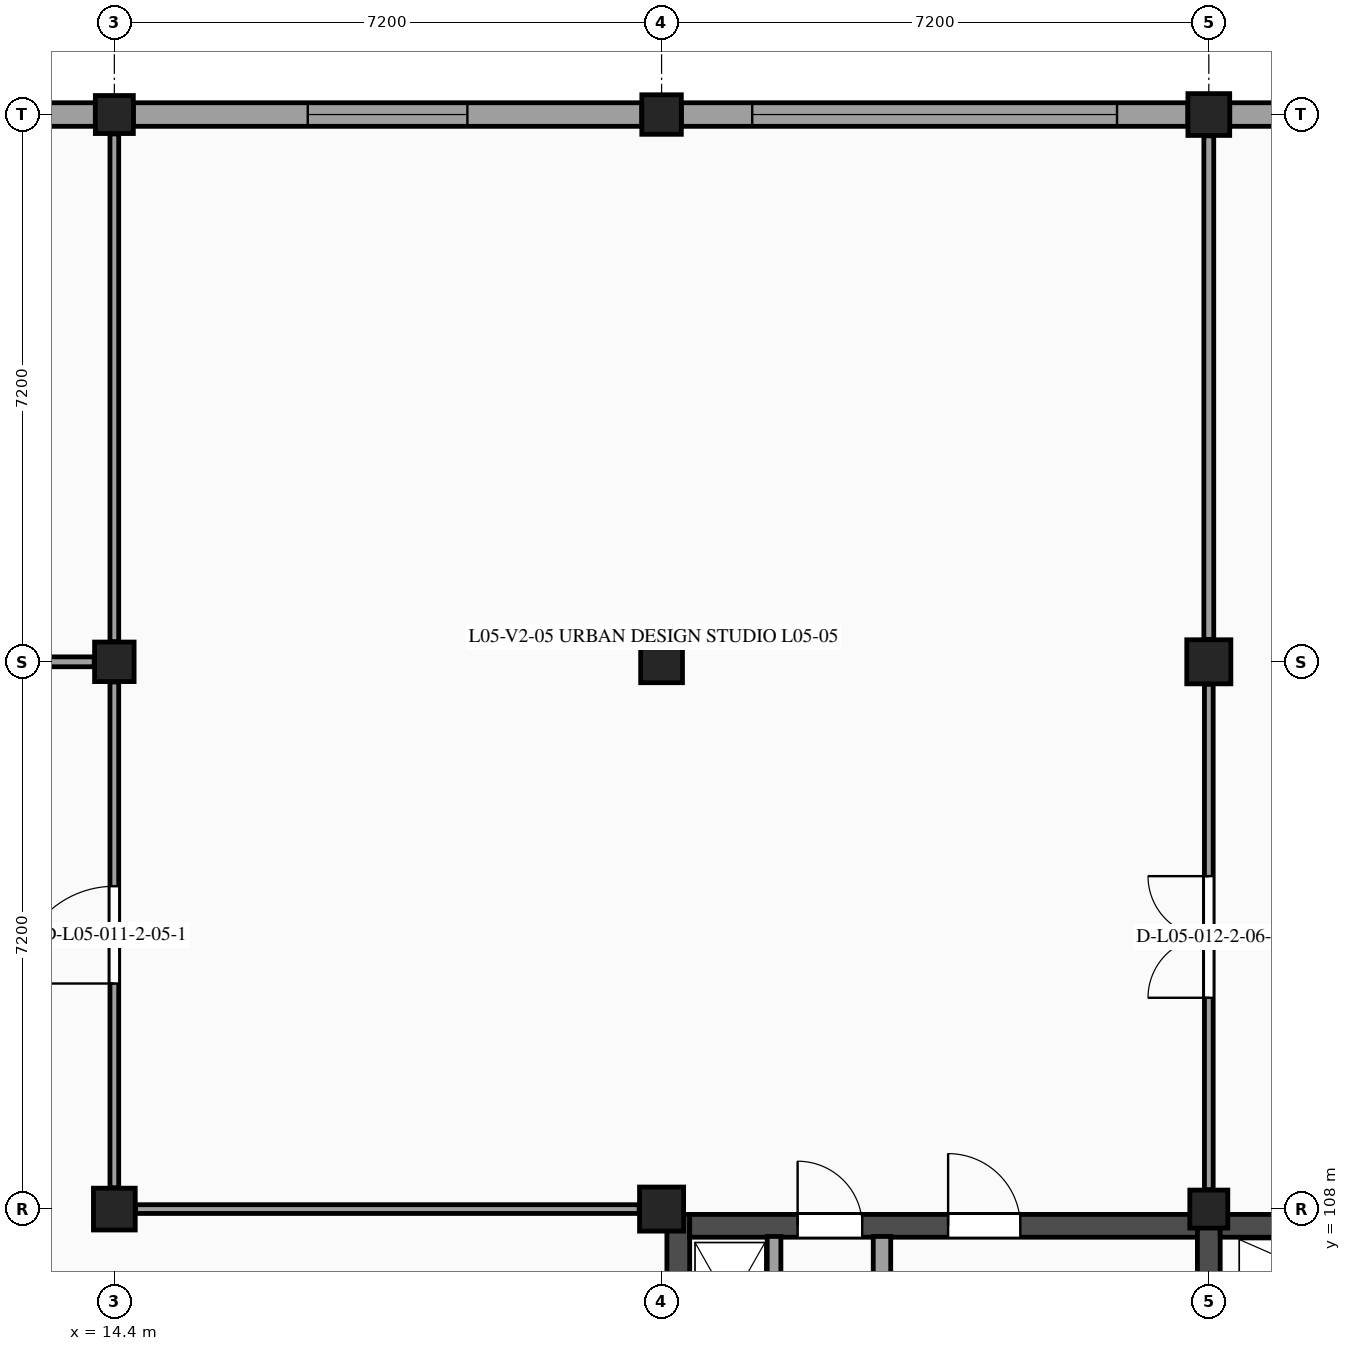
"""IFC4 building model, lengths in metres.
Left out: names, types, materials, properties, quantities, classifications, styles, units other than length and angle.
Written with IfcOpenShell. Run it as: python <this file> out.ifc"""

import sys

from ifc_helpers import new_model, si_unit, direction, frame, frame_2d, origin, origin_2d, place, context, subcontext, project, spatial, rectangle, extrude, element, fill, save


model = new_model("IFC4")
c1 = context("Model", 3, precision=1e-05, world=origin(), true_north=direction((0.0, 1.0)))
c2 = subcontext(c1, "Body", "Model", "MODEL_VIEW")
j1 = project(units=[si_unit("LENGTHUNIT", "METRE"), si_unit("PLANEANGLEUNIT", "RADIAN")], contexts=[c1])
p1 = place(None, origin())
s1 = spatial("IfcSite", under=j1, at=p1, CompositionType="ELEMENT")
p2 = place(p1, origin())
s2 = spatial("IfcBuilding", under=s1, at=p2, CompositionType="ELEMENT")
p3 = place(p2, frame((0.0, 0.0, 22.8)))
s3 = spatial("IfcBuildingStorey", under=s2, at=p3, CompositionType="ELEMENT", Elevation=22.8)
p4 = place(p3, frame((14.4, 108.0, 0.0), z_axis=(0.0, 0.0, 1.0), x_axis=(1.0, 0.0, 0.0)))
e1 = element("IfcColumn", 1, at=p4, inside=s3, PredefinedType="COLUMN", context=c2, shape_type="SweptSolid", body=[
    extrude(rectangle(XDim=0.55, YDim=0.55, at=origin_2d()), origin(), (0.0, 0.0, 1.0), 3.9),
])
p5 = place(p3, frame((14.4, 115.2, 0.0), z_axis=(0.0, 0.0, 1.0), x_axis=(1.0, 0.0, 0.0)))
e2 = element("IfcColumn", 2, at=p5, inside=s3, PredefinedType="COLUMN", context=c2, shape_type="SweptSolid", body=[
    extrude(rectangle(XDim=0.52, YDim=0.52, at=origin_2d()), origin(), (0.0, 0.0, 1.0), 3.9),
])
p6 = place(p3, frame((14.4, 122.4, 0.0), z_axis=(0.0, 0.0, 1.0), x_axis=(1.0, 0.0, 0.0)))
e3 = element("IfcColumn", 3, at=p6, inside=s3, PredefinedType="COLUMN", context=c2, shape_type="SweptSolid", body=[
    extrude(rectangle(XDim=0.5, YDim=0.5, at=origin_2d()), origin(), (0.0, 0.0, 1.0), 3.9),
])
p7 = place(p3, frame((21.6, 108.0, 0.0), z_axis=(0.0, 0.0, 1.0), x_axis=(1.0, 0.0, 0.0)))
e4 = element("IfcColumn", 4, at=p7, inside=s3, PredefinedType="COLUMN", context=c2, shape_type="SweptSolid", body=[
    extrude(rectangle(XDim=0.58, YDim=0.58, at=origin_2d()), origin(), (0.0, 0.0, 1.0), 3.9),
])
p8 = place(p3, frame((21.6, 115.2, 0.0), z_axis=(0.0, 0.0, 1.0), x_axis=(1.0, 0.0, 0.0)))
e5 = element("IfcColumn", 5, at=p8, inside=s3, PredefinedType="COLUMN", context=c2, shape_type="SweptSolid", body=[
    extrude(rectangle(XDim=0.55, YDim=0.55, at=origin_2d()), origin(), (0.0, 0.0, 1.0), 3.9),
])
p9 = place(p3, frame((21.6, 122.4, 0.0), z_axis=(0.0, 0.0, 1.0), x_axis=(1.0, 0.0, 0.0)))
e6 = element("IfcColumn", 6, at=p9, inside=s3, PredefinedType="COLUMN", context=c2, shape_type="SweptSolid", body=[
    extrude(rectangle(XDim=0.52, YDim=0.52, at=origin_2d()), origin(), (0.0, 0.0, 1.0), 3.9),
])
p10 = place(p3, frame((28.8, 108.0, 0.0), z_axis=(0.0, 0.0, 1.0), x_axis=(1.0, 0.0, 0.0)))
e7 = element("IfcColumn", 7, at=p10, inside=s3, PredefinedType="COLUMN", context=c2, shape_type="SweptSolid", body=[
    extrude(rectangle(XDim=0.5, YDim=0.5, at=origin_2d()), origin(), (0.0, 0.0, 1.0), 3.9),
])
p11 = place(p3, frame((28.8, 115.2, 0.0), z_axis=(0.0, 0.0, 1.0), x_axis=(1.0, 0.0, 0.0)))
e8 = element("IfcColumn", 8, at=p11, inside=s3, PredefinedType="COLUMN", context=c2, shape_type="SweptSolid", body=[
    extrude(rectangle(XDim=0.58, YDim=0.58, at=origin_2d()), origin(), (0.0, 0.0, 1.0), 3.9),
])
p12 = place(p3, frame((28.8, 122.4, 0.0), z_axis=(0.0, 0.0, 1.0), x_axis=(1.0, 0.0, 0.0)))
e9 = element("IfcColumn", 9, at=p12, inside=s3, PredefinedType="COLUMN", context=c2, shape_type="SweptSolid", body=[
    extrude(rectangle(XDim=0.55, YDim=0.55, at=origin_2d()), origin(), (0.0, 0.0, 1.0), 3.9),
])
p13 = place(p3, frame((7.49, 122.4, 0.0), z_axis=(0.0, 0.0, 1.0), x_axis=(1.0, 0.0, 0.0)))
e10 = element("IfcWall", 10, at=p13, inside=s3, PredefinedType="STANDARD", context=c2, shape_type="SweptSolid", body=[
    extrude(rectangle(XDim=6.66, YDim=0.31, at=frame_2d((3.33, 0.0))), origin(), (0.0, 0.0, 1.0), 3.095),
])
p14 = place(p13, frame((2.08, 0.0, 0.98)))
e11 = element("IfcOpeningElement", 11, at=p14, cuts=e10, PredefinedType="OPENING", context=c2, shape_type="SweptSolid", body=[
    extrude(rectangle(XDim=2.5, YDim=1.35, at=frame_2d((1.25, 0.675))), frame((0.0, 0.165, 0.0), z_axis=(0.0, -1.0, 0.0), x_axis=(1.0, 0.0, 0.0)), (0.0, 0.0, 1.0), 0.33),
])
p15 = place(p3, frame((14.65, 122.4, 0.0), z_axis=(0.0, 0.0, 1.0), x_axis=(1.0, 0.0, 0.0)))
e12 = element("IfcWall", 12, at=p15, inside=s3, PredefinedType="STANDARD", context=c2, shape_type="SweptSolid", body=[
    extrude(rectangle(XDim=6.69, YDim=0.31, at=frame_2d((3.345, 0.0))), origin(), (0.0, 0.0, 1.0), 3.095),
])
p16 = place(p15, frame((2.295, 0.0, 0.98)))
e13 = element("IfcOpeningElement", 13, at=p16, cuts=e12, PredefinedType="OPENING", context=c2, shape_type="SweptSolid", body=[
    extrude(rectangle(XDim=2.1, YDim=1.3, at=frame_2d((1.05, 0.65))), frame((0.0, 0.165, 0.0), z_axis=(0.0, -1.0, 0.0), x_axis=(1.0, 0.0, 0.0)), (0.0, 0.0, 1.0), 0.33),
])
p17 = place(p3, frame((21.86, 122.4, 0.0), z_axis=(0.0, 0.0, 1.0), x_axis=(1.0, 0.0, 0.0)))
e14 = element("IfcWall", 14, at=p17, inside=s3, PredefinedType="STANDARD", context=c2, shape_type="SweptSolid", body=[
    extrude(rectangle(XDim=6.665, YDim=0.31, at=frame_2d((3.333, 0.0))), origin(), (0.0, 0.0, 1.0), 3.095),
])
p18 = place(p17, frame((0.933, 0.0, 0.98)))
e15 = element("IfcOpeningElement", 15, at=p18, cuts=e14, PredefinedType="OPENING", context=c2, shape_type="SweptSolid", body=[
    extrude(rectangle(XDim=4.8, YDim=1.5, at=frame_2d((2.4, 0.75))), frame((0.0, 0.165, 0.0), z_axis=(0.0, -1.0, 0.0), x_axis=(1.0, 0.0, 0.0)), (0.0, 0.0, 1.0), 0.33),
])
p19 = place(p3, frame((29.075, 122.4, 0.0), z_axis=(0.0, 0.0, 1.0), x_axis=(1.0, 0.0, 0.0)))
e16 = element("IfcWall", 16, at=p19, inside=s3, PredefinedType="STANDARD", context=c2, shape_type="SweptSolid", body=[
    extrude(rectangle(XDim=6.635, YDim=0.31, at=frame_2d((3.317, 0.0))), origin(), (0.0, 0.0, 1.0), 3.095),
])
p20 = place(p19, frame((1.218, 0.0, 0.98)))
e17 = element("IfcOpeningElement", 17, at=p20, cuts=e16, PredefinedType="OPENING", context=c2, shape_type="SweptSolid", body=[
    extrude(rectangle(XDim=4.2, YDim=1.5, at=frame_2d((2.1, 0.75))), frame((0.0, 0.165, 0.0), z_axis=(0.0, -1.0, 0.0), x_axis=(1.0, 0.0, 0.0)), (0.0, 0.0, 1.0), 0.33),
])
p21 = place(p3, frame((21.82, 107.93, 0.0), z_axis=(0.0, 0.0, 1.0), x_axis=(0.0, -1.0, 0.0)))
e18 = element("IfcWall", 18, at=p21, inside=s3, PredefinedType="SHEAR", context=c2, shape_type="SweptSolid", body=[
    extrude(rectangle(XDim=7.06, YDim=0.3, at=frame_2d((3.53, 0.0))), origin(), (0.0, 0.0, 1.0), 3.67),
])
p22 = place(p3, frame((21.97, 107.78, 0.0), z_axis=(0.0, 0.0, 1.0), x_axis=(1.0, 0.0, 0.0)))
e19 = element("IfcWall", 19, at=p22, inside=s3, PredefinedType="SHEAR", context=c2, shape_type="SweptSolid", body=[
    extrude(rectangle(XDim=6.68, YDim=0.3, at=frame_2d((3.34, 0.0))), origin(), (0.0, 0.0, 1.0), 3.67),
])
p23 = place(p22, frame((1.42, 0.0, 0.0)))
e20 = element("IfcOpeningElement", 20, at=p23, cuts=e19, PredefinedType="OPENING", context=c2, shape_type="SweptSolid", body=[
    extrude(rectangle(XDim=0.85, YDim=2.1, at=frame_2d((0.425, 1.05))), frame((0.0, 0.16, 0.0), z_axis=(0.0, -1.0, 0.0), x_axis=(1.0, 0.0, 0.0)), (0.0, 0.0, 1.0), 0.32),
])
p24 = place(p22, frame((3.4, 0.0, 0.0)))
e21 = element("IfcOpeningElement", 21, at=p24, cuts=e19, PredefinedType="OPENING", context=c2, shape_type="SweptSolid", body=[
    extrude(rectangle(XDim=0.95, YDim=2.15, at=frame_2d((0.475, 1.075))), frame((0.0, 0.16, 0.0), z_axis=(0.0, -1.0, 0.0), x_axis=(1.0, 0.0, 0.0)), (0.0, 0.0, 1.0), 0.32),
])
p25 = place(p3, frame((24.5, 105.9, 0.0), z_axis=(0.0, 0.0, 1.0), x_axis=(0.0, 1.0, 0.0)))
e22 = element("IfcWall", 22, at=p25, inside=s3, PredefinedType="PARTITIONING", context=c2, shape_type="SweptSolid", body=[
    extrude(rectangle(XDim=1.74, YDim=0.23, at=frame_2d((0.87, 0.0))), origin(), (0.0, 0.0, 1.0), 3.67),
])
p26 = place(p3, frame((23.08, 105.88, 0.0), z_axis=(0.0, 0.0, 1.0), x_axis=(0.0, 1.0, 0.0)))
e23 = element("IfcWall", 23, at=p26, inside=s3, PredefinedType="PARTITIONING", context=c2, shape_type="SweptSolid", body=[
    extrude(rectangle(XDim=1.76, YDim=0.18, at=frame_2d((0.88, 0.0))), origin(), (0.0, 0.0, 1.0), 3.67),
])
p27 = place(p3, frame((28.8, 100.87, 0.0), z_axis=(0.0, 0.0, 1.0), x_axis=(0.0, 1.0, 0.0)))
e24 = element("IfcWall", 24, at=p27, inside=s3, PredefinedType="SHEAR", context=c2, shape_type="SweptSolid", body=[
    extrude(rectangle(XDim=7.06, YDim=0.3, at=frame_2d((3.53, 0.0))), origin(), (0.0, 0.0, 1.0), 3.67),
])
p28 = place(p27, frame((1.4, 0.0, 0.0)))
e25 = element("IfcOpeningElement", 25, at=p28, cuts=e24, PredefinedType="OPENING", context=c2, shape_type="SweptSolid", body=[
    extrude(rectangle(XDim=1.8, YDim=2.2, at=frame_2d((0.9, 1.1))), frame((0.0, 0.16, 0.0), z_axis=(0.0, -1.0, 0.0), x_axis=(1.0, 0.0, 0.0)), (0.0, 0.0, 1.0), 0.32),
])
p29 = place(p3, frame((28.95, 107.78, 0.0), z_axis=(0.0, 0.0, 1.0), x_axis=(1.0, 0.0, 0.0)))
e26 = element("IfcWall", 26, at=p29, inside=s3, PredefinedType="SHEAR", context=c2, shape_type="SweptSolid", body=[
    extrude(rectangle(XDim=6.68, YDim=0.3, at=frame_2d((3.34, 0.0))), origin(), (0.0, 0.0, 1.0), 3.67),
])
p30 = place(p3, frame((14.4, 108.28, 0.0), z_axis=(0.0, 0.0, 1.0), x_axis=(0.0, 1.0, 0.0)))
e27 = element("IfcWall", 27, at=p30, inside=s3, PredefinedType="PARTITIONING", context=c2, shape_type="SweptSolid", body=[
    extrude(rectangle(XDim=6.655, YDim=0.115, at=frame_2d((3.328, 0.0))), origin(), (0.0, 0.0, 1.0), 3.27),
])
p31 = place(p30, frame((2.688, 0.0, 0.0)))
e28 = element("IfcOpeningElement", 28, at=p31, cuts=e27, PredefinedType="OPENING", context=c2, shape_type="SweptSolid", body=[
    extrude(rectangle(XDim=1.28, YDim=2.24, at=frame_2d((0.64, 1.12))), frame((0.0, 0.067, 0.0), z_axis=(0.0, -1.0, 0.0), x_axis=(1.0, 0.0, 0.0)), (0.0, 0.0, 1.0), 0.135),
])
p32 = place(p3, frame((7.455, 115.2, 0.0), z_axis=(0.0, 0.0, 1.0), x_axis=(1.0, 0.0, 0.0)))
e29 = element("IfcWall", 29, at=p32, inside=s3, PredefinedType="PARTITIONING", context=c2, shape_type="SweptSolid", body=[
    extrude(rectangle(XDim=6.68, YDim=0.13, at=frame_2d((3.34, 0.0))), origin(), (0.0, 0.0, 1.0), 3.24),
])
p33 = place(p3, frame((14.4, 115.465, 0.0), z_axis=(0.0, 0.0, 1.0), x_axis=(0.0, 1.0, 0.0)))
e30 = element("IfcWall", 30, at=p33, inside=s3, PredefinedType="PARTITIONING", context=c2, shape_type="SweptSolid", body=[
    extrude(rectangle(XDim=6.68, YDim=0.115, at=frame_2d((3.34, 0.0))), origin(), (0.0, 0.0, 1.0), 3.265),
])
p34 = place(p3, frame((14.68, 108.0, 0.0), z_axis=(0.0, 0.0, 1.0), x_axis=(1.0, 0.0, 0.0)))
e31 = element("IfcWall", 31, at=p34, inside=s3, PredefinedType="PARTITIONING", context=c2, shape_type="SweptSolid", body=[
    extrude(rectangle(XDim=6.625, YDim=0.115, at=frame_2d((3.312, 0.0))), origin(), (0.0, 0.0, 1.0), 3.25),
])
p35 = place(p3, frame((28.8, 108.255, 0.0), z_axis=(0.0, 0.0, 1.0), x_axis=(0.0, 1.0, 0.0)))
e32 = element("IfcWall", 32, at=p35, inside=s3, PredefinedType="PARTITIONING", context=c2, shape_type="SweptSolid", body=[
    extrude(rectangle(XDim=6.65, YDim=0.115, at=frame_2d((3.325, 0.0))), origin(), (0.0, 0.0, 1.0), 3.27),
])
p36 = place(p35, frame((2.525, 0.0, 0.0)))
e33 = element("IfcOpeningElement", 33, at=p36, cuts=e32, PredefinedType="OPENING", context=c2, shape_type="SweptSolid", body=[
    extrude(rectangle(XDim=1.6, YDim=2.2, at=frame_2d((0.8, 1.1))), frame((0.0, 0.067, 0.0), z_axis=(0.0, -1.0, 0.0), x_axis=(1.0, 0.0, 0.0)), (0.0, 0.0, 1.0), 0.135),
])
p37 = place(p3, frame((28.8, 115.495, 0.0), z_axis=(0.0, 0.0, 1.0), x_axis=(0.0, 1.0, 0.0)))
e34 = element("IfcWall", 34, at=p37, inside=s3, PredefinedType="PARTITIONING", context=c2, shape_type="SweptSolid", body=[
    extrude(rectangle(XDim=6.625, YDim=0.13, at=frame_2d((3.312, 0.0))), origin(), (0.0, 0.0, 1.0), 3.265),
])
p38 = place(p16, origin())
e35 = element("IfcWindow", 35, at=p38, inside=s3, PartitioningType="SINGLE_PANEL", PredefinedType="WINDOW", context=c2, shape_type="SweptSolid", body=[
    extrude(rectangle(XDim=2.1, YDim=1.3, at=frame_2d((1.05, 0.65))), frame((0.0, -0.03, 0.0), z_axis=(0.0, -1.0, 0.0), x_axis=(1.0, 0.0, 0.0)), (0.0, 0.0, 1.0), 0.06),
])
fill(e13, e35)
p39 = place(p18, origin())
e36 = element("IfcWindow", 36, at=p39, inside=s3, PartitioningType="SINGLE_PANEL", PredefinedType="WINDOW", context=c2, shape_type="SweptSolid", body=[
    extrude(rectangle(XDim=4.8, YDim=1.5, at=frame_2d((2.4, 0.75))), frame((0.0, -0.03, 0.0), z_axis=(0.0, -1.0, 0.0), x_axis=(1.0, 0.0, 0.0)), (0.0, 0.0, 1.0), 0.06),
])
fill(e15, e36)
p40 = place(p23, origin())
e37 = element("IfcDoor", 37, at=p40, inside=s3, OperationType="SINGLE_SWING_LEFT", PredefinedType="DOOR", context=c2, shape_type="SweptSolid", body=[
    extrude(rectangle(XDim=0.85, YDim=2.1, at=frame_2d((0.425, 1.05))), frame((0.0, 0.025, 0.0), z_axis=(0.0, -1.0, 0.0), x_axis=(1.0, 0.0, 0.0)), (0.0, 0.0, 1.0), 0.05),
])
fill(e20, e37)
p41 = place(p24, origin())
e38 = element("IfcDoor", 38, at=p41, inside=s3, OperationType="SINGLE_SWING_LEFT", PredefinedType="DOOR", context=c2, shape_type="SweptSolid", body=[
    extrude(rectangle(XDim=0.95, YDim=2.15, at=frame_2d((0.475, 1.075))), frame((0.0, 0.025, 0.0), z_axis=(0.0, -1.0, 0.0), x_axis=(1.0, 0.0, 0.0)), (0.0, 0.0, 1.0), 0.05),
])
fill(e21, e38)
p42 = place(p31, origin())
e39 = element("IfcDoor", 39, at=p42, inside=s3, OperationType="SINGLE_SWING_LEFT", PredefinedType="DOOR", context=c2, shape_type="SweptSolid", body=[
    extrude(rectangle(XDim=1.28, YDim=2.24, at=frame_2d((0.64, 1.12))), frame((0.0, 0.025, 0.0), z_axis=(0.0, -1.0, 0.0), x_axis=(1.0, 0.0, 0.0)), (0.0, 0.0, 1.0), 0.05),
])
fill(e28, e39)
p43 = place(p36, origin())
e40 = element("IfcDoor", 40, at=p43, inside=s3, OperationType="DOUBLE_DOOR_SINGLE_SWING", PredefinedType="DOOR", context=c2, shape_type="SweptSolid", body=[
    extrude(rectangle(XDim=1.6, YDim=2.2, at=frame_2d((0.8, 1.1))), frame((0.0, 0.025, 0.0), z_axis=(0.0, -1.0, 0.0), x_axis=(1.0, 0.0, 0.0)), (0.0, 0.0, 1.0), 0.05),
])
fill(e33, e40)
save(model, sys.argv[1])
